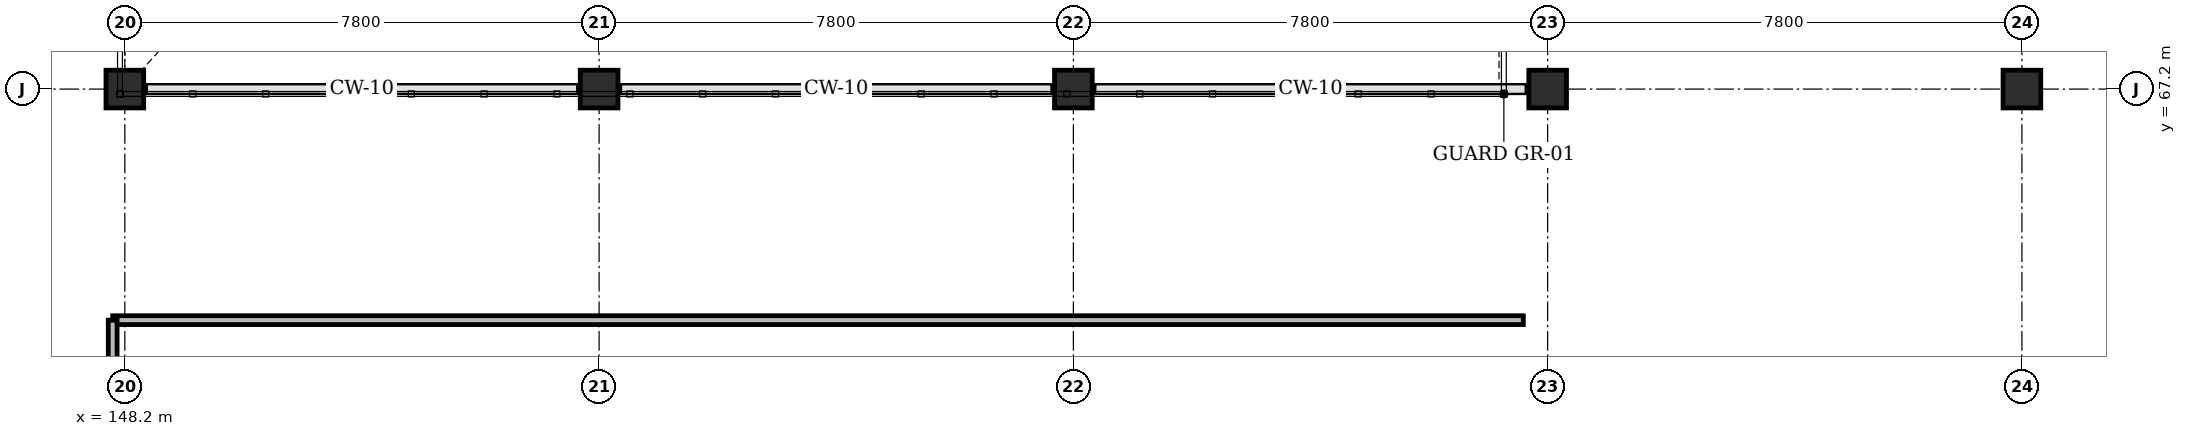
"""IFC4 building model, lengths in metres.
Left out: names, types, materials, properties, quantities, classifications, styles, units other than length and angle.
Written with IfcOpenShell. Run it as: python <this file> out.ifc"""

import sys

from ifc_helpers import new_model, si_unit, direction, frame, frame_2d, origin, origin_2d, place, context, subcontext, project, spatial, rectangle, extrude, element, save


model = new_model("IFC4")
c1 = context("Model", 3, precision=1e-05, world=origin(), true_north=direction((0.0, 1.0)))
c2 = subcontext(c1, "Body", "Model", "MODEL_VIEW")
j1 = project(units=[si_unit("LENGTHUNIT", "METRE"), si_unit("PLANEANGLEUNIT", "RADIAN")], contexts=[c1])
p1 = place(None, origin())
s1 = spatial("IfcSite", under=j1, at=p1, CompositionType="ELEMENT")
p2 = place(p1, origin())
s2 = spatial("IfcBuilding", under=s1, at=p2, CompositionType="ELEMENT")
p3 = place(p2, frame((0.0, 0.0, 9.6)))
s3 = spatial("IfcBuildingStorey", under=s2, at=p3, CompositionType="ELEMENT", Elevation=9.6)
for number, where, z_axis, x_axis in (
    (1, (148.2, 67.2, 0.0), (0.0, 0.0, 1.0), (1.0, 0.0, 0.0)),
    (2, (156.0, 67.2, 0.0), (0.0, 0.0, 1.0), (1.0, 0.0, 0.0)),
    (3, (163.8, 67.2, 0.0), (0.0, 0.0, 1.0), (1.0, 0.0, 0.0)),
    (4, (171.6, 67.2, 0.0), (0.0, 0.0, 1.0), (1.0, 0.0, 0.0)),
    (5, (179.4, 67.2, 0.0), (0.0, 0.0, 1.0), (1.0, 0.0, 0.0)),
):
    element("IfcColumn", number, at=place(p3, frame(where, z_axis=z_axis, x_axis=x_axis)), inside=s3, PredefinedType="COLUMN", context=c2, shape_type="SweptSolid", body=[
        extrude(rectangle(XDim=0.62, YDim=0.62, at=origin_2d()), origin(), (0.0, 0.0, 1.0), 4.8),
    ])
p4 = place(p3, frame((148.0, 63.4, 0.0), z_axis=(0.0, 0.0, 1.0), x_axis=(1.0, 0.0, 0.0)))
e6 = element("IfcWall", 6, at=p4, inside=s3, PredefinedType="PARTITIONING", context=c2, shape_type="SweptSolid", body=[
    extrude(rectangle(XDim=23.2, YDim=0.145, at=frame_2d((11.6, 0.0))), origin(), (0.0, 0.0, 1.0), 4.46),
])
p5 = place(p3, frame((148.0, 42.4, 0.0), z_axis=(0.0, 0.0, 1.0), x_axis=(0.0, 1.0, 0.0)))
e7 = element("IfcWall", 7, at=p5, inside=s3, PredefinedType="PARTITIONING", context=c2, shape_type="SweptSolid", body=[
    extrude(rectangle(XDim=21.0, YDim=0.145, at=frame_2d((10.5, 0.0))), origin(), (0.0, 0.0, 1.0), 3.715),
])
p6 = place(p5, frame((9.925, 0.0, 0.0)))
e8 = element("IfcOpeningElement", 8, at=p6, cuts=e7, PredefinedType="OPENING", context=c2, shape_type="SweptSolid", body=[
    extrude(rectangle(XDim=1.15, YDim=2.15, at=frame_2d((0.575, 1.075))), frame((0.0, 0.083, 0.0), z_axis=(0.0, -1.0, 0.0), x_axis=(1.0, 0.0, 0.0)), (0.0, 0.0, 1.0), 0.165),
])
save(model, sys.argv[1])
